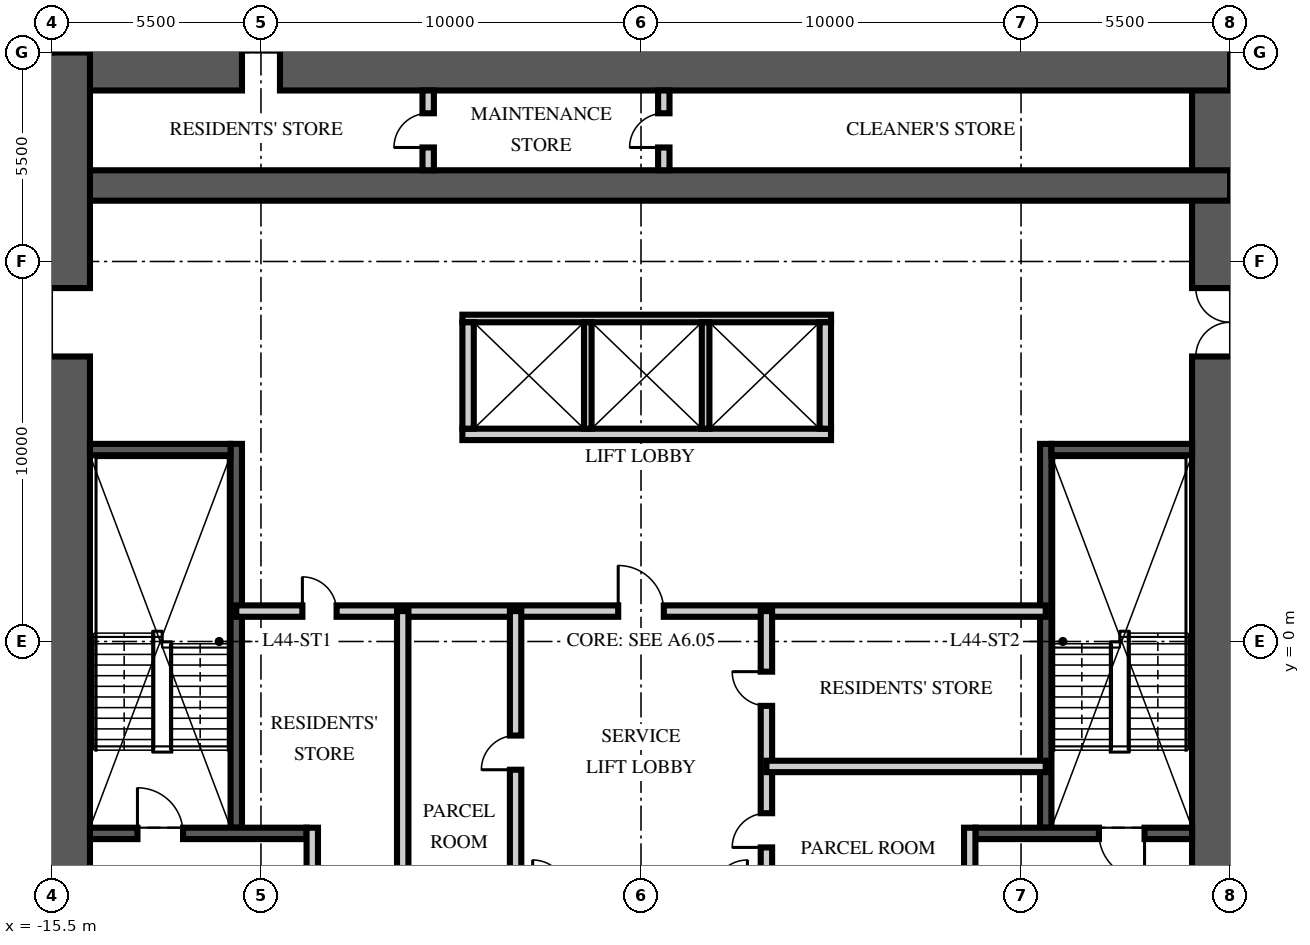
"""IFC4 building model, lengths in metres.
Left out: names, types, materials, properties, quantities, classifications, styles, units other than length and angle.
Written with IfcOpenShell. Run it as: python <this file> out.ifc"""

import sys

from ifc_helpers import new_model, si_unit, direction, frame, frame_2d, origin, place, context, subcontext, project, spatial, rectangle, extrude, element, fill, save


model = new_model("IFC4")
c1 = context("Model", 3, precision=1e-05, world=origin(), true_north=direction((0.0, 1.0)))
c2 = subcontext(c1, "Body", "Model", "MODEL_VIEW")
j1 = project(units=[si_unit("LENGTHUNIT", "METRE"), si_unit("PLANEANGLEUNIT", "RADIAN")], contexts=[c1])
p1 = place(None, origin())
s1 = spatial("IfcSite", under=j1, at=p1, CompositionType="ELEMENT")
p2 = place(p1, origin())
s2 = spatial("IfcBuilding", under=s1, at=p2, CompositionType="ELEMENT")
p3 = place(p2, frame((0.0, 0.0, 174.75)))
s3 = spatial("IfcBuildingStorey", under=s2, at=p3, CompositionType="ELEMENT", Elevation=174.75)
p4 = place(p3, frame((15.5, -15.5, -0.25), z_axis=(0.0, 0.0, 1.0), x_axis=(0.0, 1.0, 0.0)))
e1 = element("IfcWall", 1, at=p4, inside=s3, PredefinedType="SHEAR", context=c2, shape_type="SweptSolid", body=[
    extrude(rectangle(XDim=31.0, YDim=2.0, at=frame_2d((15.5, 0.0))), origin(), (0.0, 0.0, 1.0), 3.75),
])
p5 = place(p4, frame((6.5, 0.0, 0.25)))
e2 = element("IfcOpeningElement", 2, at=p5, cuts=e1, PredefinedType="OPENING", context=c2, shape_type="SweptSolid", body=[
    extrude(rectangle(XDim=1.2, YDim=2.1, at=frame_2d((0.6, 1.05))), frame((0.0, 1.01, 0.0), z_axis=(0.0, -1.0, 0.0), x_axis=(1.0, 0.0, 0.0)), (0.0, 0.0, 1.0), 2.02),
])
p6 = place(p4, frame((23.0, 0.0, 0.25)))
e3 = element("IfcOpeningElement", 3, at=p6, cuts=e1, PredefinedType="OPENING", context=c2, shape_type="SweptSolid", body=[
    extrude(rectangle(XDim=1.8, YDim=2.1, at=frame_2d((0.9, 1.05))), frame((0.0, 1.01, 0.0), z_axis=(0.0, -1.0, 0.0), x_axis=(1.0, 0.0, 0.0)), (0.0, 0.0, 1.0), 2.02),
])
p7 = place(p3, frame((-15.5, 15.5, -0.25), z_axis=(0.0, 0.0, 1.0), x_axis=(1.0, 0.0, 0.0)))
e4 = element("IfcWall", 4, at=p7, inside=s3, PredefinedType="SHEAR", context=c2, shape_type="SweptSolid", body=[
    extrude(rectangle(XDim=31.0, YDim=2.0, at=frame_2d((15.5, 0.0))), origin(), (0.0, 0.0, 1.0), 3.75),
])
p8 = place(p7, frame((5.0, 0.0, 0.25)))
e5 = element("IfcOpeningElement", 5, at=p8, cuts=e4, PredefinedType="OPENING", context=c2, shape_type="SweptSolid", body=[
    extrude(rectangle(XDim=1.0, YDim=2.1, at=frame_2d((0.5, 1.05))), frame((0.0, 1.01, 0.0), z_axis=(0.0, -1.0, 0.0), x_axis=(1.0, 0.0, 0.0)), (0.0, 0.0, 1.0), 2.02),
])
p9 = place(p3, frame((-15.5, 12.0, -0.25), z_axis=(0.0, 0.0, 1.0), x_axis=(1.0, 0.0, 0.0)))
e6 = element("IfcWall", 6, at=p9, inside=s3, PredefinedType="SHEAR", context=c2, shape_type="SweptSolid", body=[
    extrude(rectangle(XDim=31.0, YDim=0.8, at=frame_2d((15.5, 0.0))), origin(), (0.0, 0.0, 1.0), 3.75),
])
p10 = place(p3, frame((-15.5, -15.5, -0.25), z_axis=(0.0, 0.0, 1.0), x_axis=(0.0, 1.0, 0.0)))
e7 = element("IfcWall", 7, at=p10, inside=s3, PredefinedType="SHEAR", context=c2, shape_type="SweptSolid", body=[
    extrude(rectangle(XDim=31.0, YDim=2.0, at=frame_2d((15.5, 0.0))), origin(), (0.0, 0.0, 1.0), 3.75),
])
p11 = place(p10, frame((6.5, 0.0, 0.25)))
e8 = element("IfcOpeningElement", 8, at=p11, cuts=e7, PredefinedType="OPENING", context=c2, shape_type="SweptSolid", body=[
    extrude(rectangle(XDim=1.2, YDim=2.1, at=frame_2d((0.6, 1.05))), frame((0.0, 1.01, 0.0), z_axis=(0.0, -1.0, 0.0), x_axis=(1.0, 0.0, 0.0)), (0.0, 0.0, 1.0), 2.02),
])
p12 = place(p10, frame((23.0, 0.0, 0.25)))
e9 = element("IfcOpeningElement", 9, at=p12, cuts=e7, PredefinedType="OPENING", context=c2, shape_type="SweptSolid", body=[
    extrude(rectangle(XDim=1.8, YDim=2.1, at=frame_2d((0.9, 1.05))), frame((0.0, 1.01, 0.0), z_axis=(0.0, -1.0, 0.0), x_axis=(1.0, 0.0, 0.0)), (0.0, 0.0, 1.0), 2.02),
])
p13 = place(p3, frame((-10.65, -4.9, 0.0), z_axis=(0.0, 0.0, 1.0), x_axis=(0.0, 1.0, 0.0)))
e10 = element("IfcWall", 10, at=p13, inside=s3, PredefinedType="SOLIDWALL", context=c2, shape_type="SweptSolid", body=[
    extrude(rectangle(XDim=10.1, YDim=0.3, at=frame_2d((5.05, 0.0))), origin(), (0.0, 0.0, 1.0), 3.5),
])
p14 = place(p3, frame((-14.5, -5.05, 0.0), z_axis=(0.0, 0.0, 1.0), x_axis=(1.0, 0.0, 0.0)))
e11 = element("IfcWall", 11, at=p14, inside=s3, PredefinedType="SOLIDWALL", context=c2, shape_type="SweptSolid", body=[
    extrude(rectangle(XDim=5.7, YDim=0.3, at=frame_2d((2.85, 0.0))), origin(), (0.0, 0.0, 1.0), 3.5),
])
p15 = place(p14, frame((1.25, 0.0, 0.0)))
e12 = element("IfcOpeningElement", 12, at=p15, cuts=e11, PredefinedType="OPENING", context=c2, shape_type="SweptSolid", body=[
    extrude(rectangle(XDim=1.2, YDim=2.1, at=frame_2d((0.6, 1.05))), frame((0.0, 0.16, 0.0), z_axis=(0.0, -1.0, 0.0), x_axis=(1.0, 0.0, 0.0)), (0.0, 0.0, 1.0), 0.32),
])
p16 = place(p3, frame((-14.5, 5.05, 0.0), z_axis=(0.0, 0.0, 1.0), x_axis=(1.0, 0.0, 0.0)))
e13 = element("IfcWall", 13, at=p16, inside=s3, PredefinedType="SOLIDWALL", context=c2, shape_type="SweptSolid", body=[
    extrude(rectangle(XDim=3.7, YDim=0.3, at=frame_2d((1.85, 0.0))), origin(), (0.0, 0.0, 1.0), 3.5),
])
p17 = place(p3, frame((-8.65, -11.6, 0.0), z_axis=(0.0, 0.0, 1.0), x_axis=(0.0, 1.0, 0.0)))
e14 = element("IfcWall", 14, at=p17, inside=s3, PredefinedType="PARTITIONING", context=c2, shape_type="SweptSolid", body=[
    extrude(rectangle(XDim=6.7, YDim=0.3, at=frame_2d((3.35, 0.0))), origin(), (0.0, 0.0, 1.0), 3.5),
])
p18 = place(p17, frame((2.85, 0.0, 0.0)))
e15 = element("IfcOpeningElement", 15, at=p18, cuts=e14, PredefinedType="OPENING", context=c2, shape_type="SweptSolid", body=[
    extrude(rectangle(XDim=1.1, YDim=2.1, at=frame_2d((0.55, 1.05))), frame((0.0, 0.16, 0.0), z_axis=(0.0, -1.0, 0.0), x_axis=(1.0, 0.0, 0.0)), (0.0, 0.0, 1.0), 0.32),
])
p19 = place(p3, frame((10.65, -4.9, 0.0), z_axis=(0.0, 0.0, 1.0), x_axis=(0.0, 1.0, 0.0)))
e16 = element("IfcWall", 16, at=p19, inside=s3, PredefinedType="SOLIDWALL", context=c2, shape_type="SweptSolid", body=[
    extrude(rectangle(XDim=10.1, YDim=0.3, at=frame_2d((5.05, 0.0))), origin(), (0.0, 0.0, 1.0), 3.5),
])
p20 = place(p3, frame((14.5, -5.05, 0.0), z_axis=(0.0, 0.0, 1.0), x_axis=(-1.0, 0.0, 0.0)))
e17 = element("IfcWall", 17, at=p20, inside=s3, PredefinedType="SOLIDWALL", context=c2, shape_type="SweptSolid", body=[
    extrude(rectangle(XDim=5.7, YDim=0.3, at=frame_2d((2.85, 0.0))), origin(), (0.0, 0.0, 1.0), 3.5),
])
p21 = place(p20, frame((1.25, 0.0, 0.0)))
e18 = element("IfcOpeningElement", 18, at=p21, cuts=e17, PredefinedType="OPENING", context=c2, shape_type="SweptSolid", body=[
    extrude(rectangle(XDim=1.2, YDim=2.1, at=frame_2d((0.6, 1.05))), frame((0.0, 0.16, 0.0), z_axis=(0.0, -1.0, 0.0), x_axis=(1.0, 0.0, 0.0)), (0.0, 0.0, 1.0), 0.32),
])
p22 = place(p3, frame((14.5, 5.05, 0.0), z_axis=(0.0, 0.0, 1.0), x_axis=(-1.0, 0.0, 0.0)))
e19 = element("IfcWall", 19, at=p22, inside=s3, PredefinedType="SOLIDWALL", context=c2, shape_type="SweptSolid", body=[
    extrude(rectangle(XDim=3.7, YDim=0.3, at=frame_2d((1.85, 0.0))), origin(), (0.0, 0.0, 1.0), 3.5),
])
p23 = place(p3, frame((8.65, -11.6, 0.0), z_axis=(0.0, 0.0, 1.0), x_axis=(0.0, 1.0, 0.0)))
e20 = element("IfcWall", 20, at=p23, inside=s3, PredefinedType="PARTITIONING", context=c2, shape_type="SweptSolid", body=[
    extrude(rectangle(XDim=6.7, YDim=0.3, at=frame_2d((3.35, 0.0))), origin(), (0.0, 0.0, 1.0), 3.5),
])
p24 = place(p23, frame((2.85, 0.0, 0.0)))
e21 = element("IfcOpeningElement", 21, at=p24, cuts=e20, PredefinedType="OPENING", context=c2, shape_type="SweptSolid", body=[
    extrude(rectangle(XDim=1.1, YDim=2.1, at=frame_2d((0.55, 1.05))), frame((0.0, 0.16, 0.0), z_axis=(0.0, -1.0, 0.0), x_axis=(1.0, 0.0, 0.0)), (0.0, 0.0, 1.0), 0.32),
])
p25 = place(p3, frame((-4.7, 5.45, 0.0), z_axis=(0.0, 0.0, 1.0), x_axis=(1.0, 0.0, 0.0)))
e22 = element("IfcWall", 22, at=p25, inside=s3, PredefinedType="PARTITIONING", context=c2, shape_type="SweptSolid", body=[
    extrude(rectangle(XDim=9.7, YDim=0.3, at=frame_2d((4.85, 0.0))), origin(), (0.0, 0.0, 1.0), 3.5),
])
p26 = place(p3, frame((-4.7, 8.5, 0.0), z_axis=(0.0, 0.0, 1.0), x_axis=(1.0, 0.0, 0.0)))
e23 = element("IfcWall", 23, at=p26, inside=s3, PredefinedType="PARTITIONING", context=c2, shape_type="SweptSolid", body=[
    extrude(rectangle(XDim=9.7, YDim=0.2, at=frame_2d((4.85, 0.0))), origin(), (0.0, 0.0, 1.0), 3.5),
])
for number, where, z_axis, x_axis in (
    (24, (-4.55, 5.6, 0.0), (0.0, 0.0, 1.0), (0.0, 1.0, 0.0)),
    (25, (4.85, 5.6, 0.0), (0.0, 0.0, 1.0), (0.0, 1.0, 0.0)),
):
    element("IfcWall", number, at=place(p3, frame(where, z_axis=z_axis, x_axis=x_axis)), inside=s3, PredefinedType="PARTITIONING", context=c2, shape_type="SweptSolid", body=[
        extrude(rectangle(XDim=2.8, YDim=0.3, at=frame_2d((1.4, 0.0))), origin(), (0.0, 0.0, 1.0), 3.5),
    ])
for number, where, z_axis, x_axis in (
    (26, (-1.4, 5.6, 0.0), (0.0, 0.0, 1.0), (0.0, 1.0, 0.0)),
    (27, (1.7, 5.6, 0.0), (0.0, 0.0, 1.0), (0.0, 1.0, 0.0)),
):
    element("IfcWall", number, at=place(p3, frame(where, z_axis=z_axis, x_axis=x_axis)), inside=s3, PredefinedType="PARTITIONING", context=c2, shape_type="SweptSolid", body=[
        extrude(rectangle(XDim=2.8, YDim=0.2, at=frame_2d((1.4, 0.0))), origin(), (0.0, 0.0, 1.0), 3.5),
    ])
p27 = place(p3, frame((-10.65, 0.8, 0.0), z_axis=(0.0, 0.0, 1.0), x_axis=(1.0, 0.0, 0.0)))
e28 = element("IfcWall", 28, at=p27, inside=s3, PredefinedType="PARTITIONING", context=c2, shape_type="SweptSolid", body=[
    extrude(rectangle(XDim=21.3, YDim=0.3, at=frame_2d((10.65, 0.0))), origin(), (0.0, 0.0, 1.0), 3.5),
])
p28 = place(p27, frame((10.05, 0.0, 0.0)))
e29 = element("IfcOpeningElement", 29, at=p28, cuts=e28, PredefinedType="OPENING", context=c2, shape_type="SweptSolid", body=[
    extrude(rectangle(XDim=1.2, YDim=2.1, at=frame_2d((0.6, 1.05))), frame((0.0, 0.16, 0.0), z_axis=(0.0, -1.0, 0.0), x_axis=(1.0, 0.0, 0.0)), (0.0, 0.0, 1.0), 0.32),
])
p29 = place(p27, frame((1.74, 0.0, 0.0)))
e30 = element("IfcOpeningElement", 30, at=p29, cuts=e28, PredefinedType="OPENING", context=c2, shape_type="SweptSolid", body=[
    extrude(rectangle(XDim=0.9, YDim=2.1, at=frame_2d((0.45, 1.05))), frame((0.0, 0.16, 0.0), z_axis=(0.0, -1.0, 0.0), x_axis=(1.0, 0.0, 0.0)), (0.0, 0.0, 1.0), 0.32),
])
p30 = place(p3, frame((-3.3, -6.65, 0.0), z_axis=(0.0, 0.0, 1.0), x_axis=(0.0, 1.0, 0.0)))
e31 = element("IfcWall", 31, at=p30, inside=s3, PredefinedType="PARTITIONING", context=c2, shape_type="SweptSolid", body=[
    extrude(rectangle(XDim=7.45, YDim=0.3, at=frame_2d((3.725, 0.0))), origin(), (0.0, 0.0, 1.0), 3.5),
])
p31 = place(p30, frame((3.275, 0.0, 0.0)))
e32 = element("IfcOpeningElement", 32, at=p31, cuts=e31, PredefinedType="OPENING", context=c2, shape_type="SweptSolid", body=[
    extrude(rectangle(XDim=0.9, YDim=2.1, at=frame_2d((0.45, 1.05))), frame((0.0, 0.16, 0.0), z_axis=(0.0, -1.0, 0.0), x_axis=(1.0, 0.0, 0.0)), (0.0, 0.0, 1.0), 0.32),
])
p32 = place(p3, frame((3.3, -6.65, 0.0), z_axis=(0.0, 0.0, 1.0), x_axis=(0.0, 1.0, 0.0)))
e33 = element("IfcWall", 33, at=p32, inside=s3, PredefinedType="PARTITIONING", context=c2, shape_type="SweptSolid", body=[
    extrude(rectangle(XDim=7.45, YDim=0.3, at=frame_2d((3.725, 0.0))), origin(), (0.0, 0.0, 1.0), 3.5),
])
p33 = place(p32, frame((1.231, 0.0, 0.0)))
e34 = element("IfcOpeningElement", 34, at=p33, cuts=e33, PredefinedType="OPENING", context=c2, shape_type="SweptSolid", body=[
    extrude(rectangle(XDim=0.9, YDim=2.1, at=frame_2d((0.45, 1.05))), frame((0.0, 0.16, 0.0), z_axis=(0.0, -1.0, 0.0), x_axis=(1.0, 0.0, 0.0)), (0.0, 0.0, 1.0), 0.32),
])
p34 = place(p32, frame((4.956, 0.0, 0.0)))
e35 = element("IfcOpeningElement", 35, at=p34, cuts=e33, PredefinedType="OPENING", context=c2, shape_type="SweptSolid", body=[
    extrude(rectangle(XDim=0.9, YDim=2.1, at=frame_2d((0.45, 1.05))), frame((0.0, 0.16, 0.0), z_axis=(0.0, -1.0, 0.0), x_axis=(1.0, 0.0, 0.0)), (0.0, 0.0, 1.0), 0.32),
])
p35 = place(p3, frame((-6.27, -6.65, 0.0), z_axis=(0.0, 0.0, 1.0), x_axis=(0.0, 1.0, 0.0)))
e36 = element("IfcWall", 36, at=p35, inside=s3, PredefinedType="PARTITIONING", context=c2, shape_type="SweptSolid", body=[
    extrude(rectangle(XDim=7.45, YDim=0.3, at=frame_2d((3.725, 0.0))), origin(), (0.0, 0.0, 1.0), 3.5),
])
p36 = place(p3, frame((10.65, -3.288, 0.0), z_axis=(0.0, 0.0, 1.0), x_axis=(-1.0, 0.0, 0.0)))
e37 = element("IfcWall", 37, at=p36, inside=s3, PredefinedType="PARTITIONING", context=c2, shape_type="SweptSolid", body=[
    extrude(rectangle(XDim=7.35, YDim=0.3, at=frame_2d((3.675, 0.0))), origin(), (0.0, 0.0, 1.0), 3.5),
])
p37 = place(p3, frame((-5.6, 12.4, 0.0), z_axis=(0.0, 0.0, 1.0), x_axis=(0.0, 1.0, 0.0)))
e38 = element("IfcWall", 38, at=p37, inside=s3, PredefinedType="PARTITIONING", context=c2, shape_type="SweptSolid", body=[
    extrude(rectangle(XDim=2.1, YDim=0.3, at=frame_2d((1.05, 0.0))), origin(), (0.0, 0.0, 1.0), 3.5),
])
p38 = place(p37, frame((0.6, 0.0, 0.0)))
e39 = element("IfcOpeningElement", 39, at=p38, cuts=e38, PredefinedType="OPENING", context=c2, shape_type="SweptSolid", body=[
    extrude(rectangle(XDim=0.9, YDim=2.1, at=frame_2d((0.45, 1.05))), frame((0.0, 0.16, 0.0), z_axis=(0.0, -1.0, 0.0), x_axis=(1.0, 0.0, 0.0)), (0.0, 0.0, 1.0), 0.32),
])
p39 = place(p3, frame((0.6, 12.4, 0.0), z_axis=(0.0, 0.0, 1.0), x_axis=(0.0, 1.0, 0.0)))
e40 = element("IfcWall", 40, at=p39, inside=s3, PredefinedType="PARTITIONING", context=c2, shape_type="SweptSolid", body=[
    extrude(rectangle(XDim=2.1, YDim=0.3, at=frame_2d((1.05, 0.0))), origin(), (0.0, 0.0, 1.0), 3.5),
])
p40 = place(p39, frame((0.6, 0.0, 0.0)))
e41 = element("IfcOpeningElement", 41, at=p40, cuts=e40, PredefinedType="OPENING", context=c2, shape_type="SweptSolid", body=[
    extrude(rectangle(XDim=0.9, YDim=2.1, at=frame_2d((0.45, 1.05))), frame((0.0, 0.16, 0.0), z_axis=(0.0, -1.0, 0.0), x_axis=(1.0, 0.0, 0.0)), (0.0, 0.0, 1.0), 0.32),
])
p41 = place(p15, origin())
e42 = element("IfcDoor", 42, at=p41, inside=s3, OperationType="SINGLE_SWING_LEFT", PredefinedType="DOOR", context=c2, shape_type="SweptSolid", body=[
    extrude(rectangle(XDim=1.2, YDim=2.1, at=frame_2d((0.6, 1.05))), frame((0.0, 0.025, 0.0), z_axis=(0.0, -1.0, 0.0), x_axis=(1.0, 0.0, 0.0)), (0.0, 0.0, 1.0), 0.05),
])
fill(e12, e42)
p42 = place(p12, origin())
e43 = element("IfcDoor", 43, at=p42, inside=s3, OperationType="DOUBLE_DOOR_SINGLE_SWING", PredefinedType="DOOR", context=c2, shape_type="SweptSolid", body=[
    extrude(rectangle(XDim=1.8, YDim=2.1, at=frame_2d((0.9, 1.05))), frame((0.0, 0.025, 0.0), z_axis=(0.0, -1.0, 0.0), x_axis=(1.0, 0.0, 0.0)), (0.0, 0.0, 1.0), 0.05),
])
fill(e9, e43)
p43 = place(p21, origin())
e44 = element("IfcDoor", 44, at=p43, inside=s3, OperationType="SINGLE_SWING_LEFT", PredefinedType="DOOR", context=c2, shape_type="SweptSolid", body=[
    extrude(rectangle(XDim=1.2, YDim=2.1, at=frame_2d((0.6, 1.05))), frame((0.0, 0.025, 0.0), z_axis=(0.0, -1.0, 0.0), x_axis=(1.0, 0.0, 0.0)), (0.0, 0.0, 1.0), 0.05),
])
fill(e18, e44)
p44 = place(p6, origin())
e45 = element("IfcDoor", 45, at=p44, inside=s3, OperationType="DOUBLE_DOOR_SINGLE_SWING", PredefinedType="DOOR", context=c2, shape_type="SweptSolid", body=[
    extrude(rectangle(XDim=1.8, YDim=2.1, at=frame_2d((0.9, 1.05))), frame((0.0, 0.025, 0.0), z_axis=(0.0, -1.0, 0.0), x_axis=(1.0, 0.0, 0.0)), (0.0, 0.0, 1.0), 0.05),
])
fill(e3, e45)
p45 = place(p28, origin())
e46 = element("IfcDoor", 46, at=p45, inside=s3, OperationType="SINGLE_SWING_LEFT", PredefinedType="DOOR", context=c2, shape_type="SweptSolid", body=[
    extrude(rectangle(XDim=1.2, YDim=2.1, at=frame_2d((0.6, 1.05))), frame((0.0, 0.025, 0.0), z_axis=(0.0, -1.0, 0.0), x_axis=(1.0, 0.0, 0.0)), (0.0, 0.0, 1.0), 0.05),
])
fill(e29, e46)
p46 = place(p31, origin())
e47 = element("IfcDoor", 47, at=p46, inside=s3, OperationType="SINGLE_SWING_LEFT", PredefinedType="DOOR", context=c2, shape_type="SweptSolid", body=[
    extrude(rectangle(XDim=0.9, YDim=2.1, at=frame_2d((0.45, 1.05))), frame((0.0, 0.025, 0.0), z_axis=(0.0, -1.0, 0.0), x_axis=(1.0, 0.0, 0.0)), (0.0, 0.0, 1.0), 0.05),
])
fill(e32, e47)
p47 = place(p29, origin())
e48 = element("IfcDoor", 48, at=p47, inside=s3, OperationType="SINGLE_SWING_LEFT", PredefinedType="DOOR", context=c2, shape_type="SweptSolid", body=[
    extrude(rectangle(XDim=0.9, YDim=2.1, at=frame_2d((0.45, 1.05))), frame((0.0, 0.025, 0.0), z_axis=(0.0, -1.0, 0.0), x_axis=(1.0, 0.0, 0.0)), (0.0, 0.0, 1.0), 0.05),
])
fill(e30, e48)
p48 = place(p33, origin())
e49 = element("IfcDoor", 49, at=p48, inside=s3, OperationType="SINGLE_SWING_LEFT", PredefinedType="DOOR", context=c2, shape_type="SweptSolid", body=[
    extrude(rectangle(XDim=0.9, YDim=2.1, at=frame_2d((0.45, 1.05))), frame((0.0, 0.025, 0.0), z_axis=(0.0, -1.0, 0.0), x_axis=(1.0, 0.0, 0.0)), (0.0, 0.0, 1.0), 0.05),
])
fill(e34, e49)
p49 = place(p34, origin())
e50 = element("IfcDoor", 50, at=p49, inside=s3, OperationType="SINGLE_SWING_RIGHT", PredefinedType="DOOR", context=c2, shape_type="SweptSolid", body=[
    extrude(rectangle(XDim=0.9, YDim=2.1, at=frame_2d((0.45, 1.05))), frame((0.0, 0.025, 0.0), z_axis=(0.0, -1.0, 0.0), x_axis=(1.0, 0.0, 0.0)), (0.0, 0.0, 1.0), 0.05),
])
fill(e35, e50)
p50 = place(p38, origin())
e51 = element("IfcDoor", 51, at=p50, inside=s3, OperationType="SINGLE_SWING_LEFT", PredefinedType="DOOR", context=c2, shape_type="SweptSolid", body=[
    extrude(rectangle(XDim=0.9, YDim=2.1, at=frame_2d((0.45, 1.05))), frame((0.0, 0.025, 0.0), z_axis=(0.0, -1.0, 0.0), x_axis=(1.0, 0.0, 0.0)), (0.0, 0.0, 1.0), 0.05),
])
fill(e39, e51)
p51 = place(p40, origin())
e52 = element("IfcDoor", 52, at=p51, inside=s3, OperationType="SINGLE_SWING_LEFT", PredefinedType="DOOR", context=c2, shape_type="SweptSolid", body=[
    extrude(rectangle(XDim=0.9, YDim=2.1, at=frame_2d((0.45, 1.05))), frame((0.0, 0.025, 0.0), z_axis=(0.0, -1.0, 0.0), x_axis=(1.0, 0.0, 0.0)), (0.0, 0.0, 1.0), 0.05),
])
fill(e41, e52)
p52 = place(p8, origin())
e53 = element("IfcDoor", 53, at=p52, inside=s3, OperationType="SINGLE_SWING_RIGHT", PredefinedType="DOOR", context=c2, shape_type="SweptSolid", body=[
    extrude(rectangle(XDim=1.0, YDim=2.1, at=frame_2d((0.5, 1.05))), frame((0.0, 0.025, 0.0), z_axis=(0.0, -1.0, 0.0), x_axis=(1.0, 0.0, 0.0)), (0.0, 0.0, 1.0), 0.05),
])
fill(e5, e53)
save(model, sys.argv[1])
